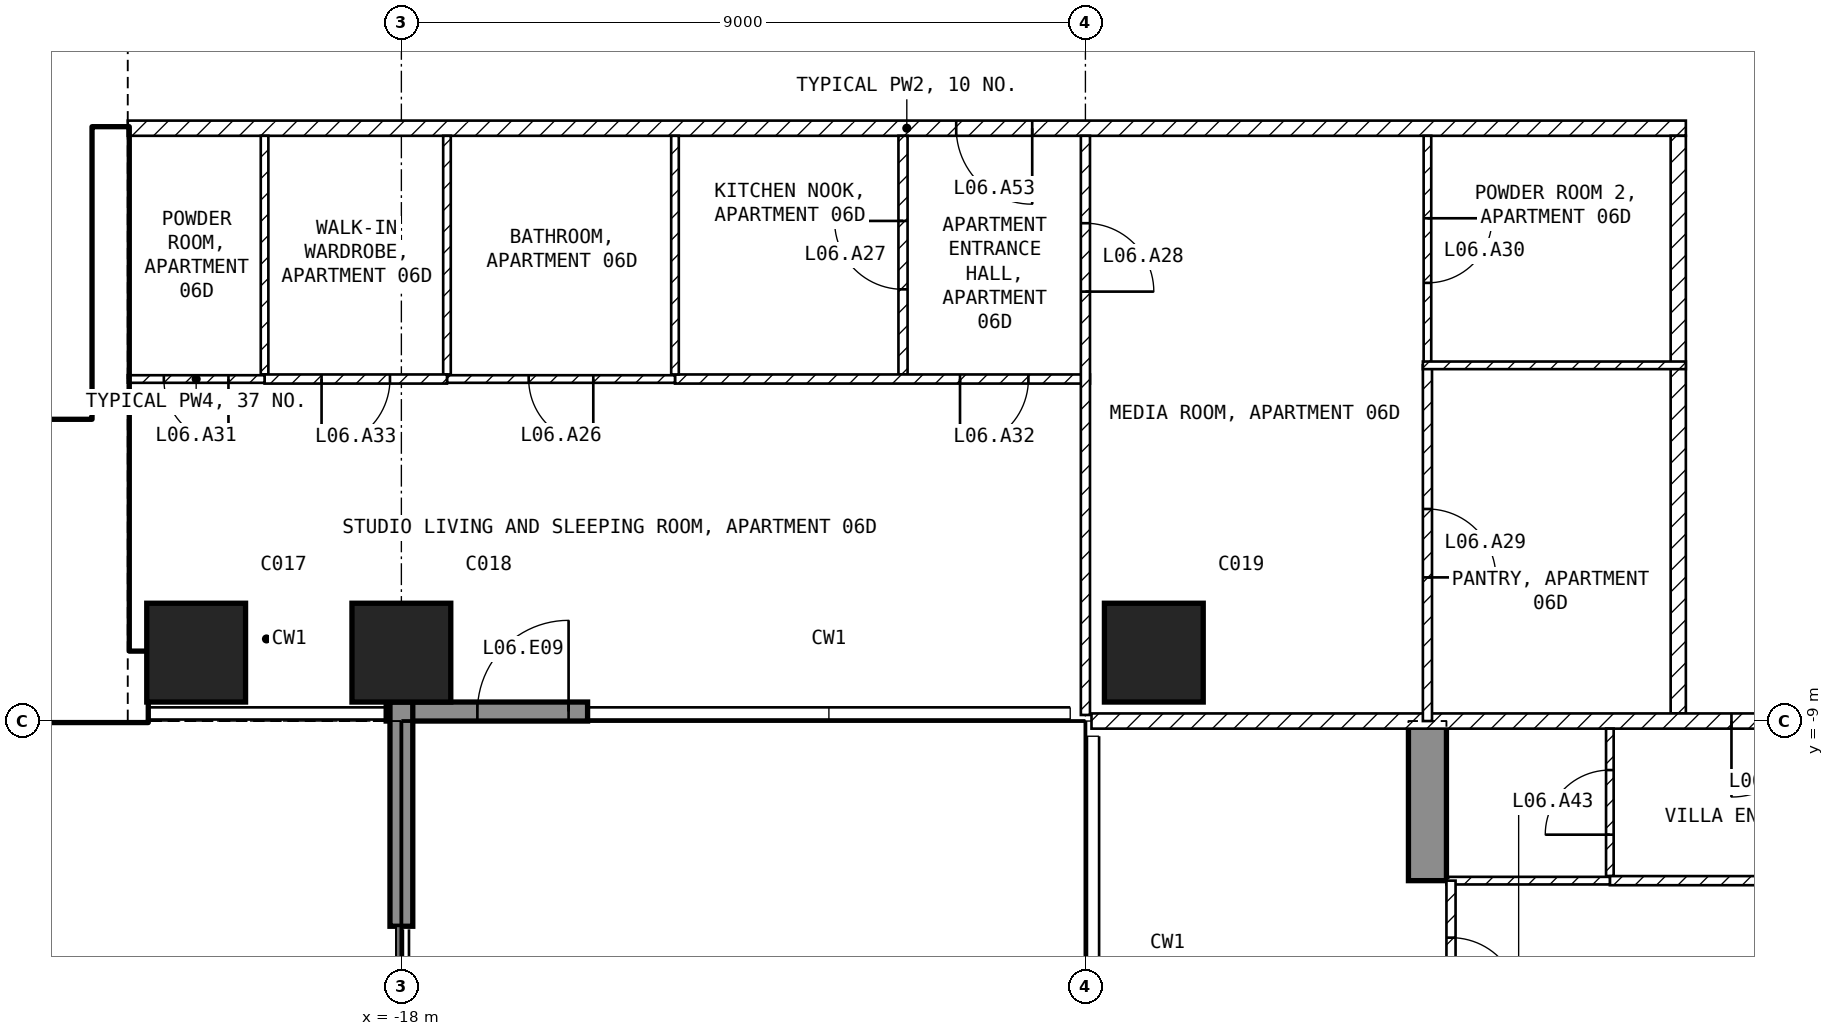
"""IFC4 building model, lengths in metres.
Left out: names, types, materials, properties, quantities, classifications, styles, units other than length and angle.
Written with IfcOpenShell. Run it as: python <this file> out.ifc"""

import sys

from ifc_helpers import new_model, si_unit, direction, frame, frame_2d, origin, origin_2d, place, context, subcontext, project, spatial, polyline, rectangle, outline, extrude, element, fill, save


model = new_model("IFC4")
c1 = context("Model", 3, precision=1e-05, world=origin(), true_north=direction((0.0, 1.0)))
c2 = subcontext(c1, "Body", "Model", "MODEL_VIEW")
j1 = project(units=[si_unit("LENGTHUNIT", "METRE"), si_unit("PLANEANGLEUNIT", "RADIAN")], contexts=[c1])
p1 = place(None, origin())
s1 = spatial("IfcSite", under=j1, at=p1, CompositionType="ELEMENT")
p2 = place(p1, origin())
s2 = spatial("IfcBuilding", under=s1, at=p2, CompositionType="ELEMENT")
p3 = place(p2, frame((0.0, 0.0, 40.0)))
s3 = spatial("IfcBuildingStorey", under=s2, at=p3, CompositionType="ELEMENT", Elevation=40.0)
for number, where, z_axis, x_axis in (
    (1, (-20.7, -8.1, -0.25), (0.0, 0.0, 1.0), (1.0, 0.0, 0.0)),
    (2, (-18.0, -8.1, -0.25), (0.0, 0.0, 1.0), (1.0, 0.0, 0.0)),
    (3, (-8.1, -8.1, -0.25), (0.0, 0.0, 1.0), (1.0, 0.0, 0.0)),
):
    element("IfcColumn", number, at=place(p3, frame(where, z_axis=z_axis, x_axis=x_axis)), inside=s3, PredefinedType="COLUMN", context=c2, shape_type="SweptSolid", body=[
        extrude(rectangle(XDim=1.3, YDim=1.3, at=origin_2d()), origin(), (0.0, 0.0, 1.0), 3.5),
    ])
p4 = place(p3, frame((-4.75, -25.45, -0.25), z_axis=(1.0, 0.0, 0.0), x_axis=(0.0, 1.0, 0.0)))
e4 = element("IfcWall", 4, at=p4, inside=s3, PredefinedType="SHEAR", context=c2, shape_type="SweptSolid", body=[
    extrude(outline(polyline([(0.0, 0.0), (4.15, 0.0), (4.15, 2.65), (6.55, 2.65), (6.55, 0.0), (11.95, 0.0), (11.95, 2.65), (14.35, 2.65), (14.35, 0.0), (16.45, 0.0), (16.45, 3.5), (0.0, 3.5), (0.0, 0.0)])), origin(), (0.0, 0.0, 1.0), 0.5),
])
p5 = place(p3, frame((-18.2, -8.875, 0.0), z_axis=(0.0, 0.0, 1.0), x_axis=(1.0, 0.0, 0.0)))
e5 = element("IfcWall", 5, at=p5, inside=s3, PredefinedType="SOLIDWALL", context=c2, shape_type="SweptSolid", body=[
    extrude(rectangle(XDim=2.65, YDim=0.25, at=frame_2d((1.325, 0.0))), origin(), (0.0, 0.0, 1.0), 3.25),
])
p6 = place(p5, frame((1.2, 0.0, 0.0)))
e6 = element("IfcOpeningElement", 6, at=p6, cuts=e5, PredefinedType="OPENING", context=c2, shape_type="SweptSolid", body=[
    extrude(rectangle(XDim=1.2, YDim=2.4, at=frame_2d((0.6, 1.2))), frame((0.0, 0.135, 0.0), z_axis=(0.0, -1.0, 0.0), x_axis=(1.0, 0.0, 0.0)), (0.0, 0.0, 1.0), 0.27),
])
p7 = place(p3, frame((-18.0, -8.75, 0.0), z_axis=(0.0, 0.0, 1.0), x_axis=(0.0, -1.0, 0.0)))
e7 = element("IfcWall", 7, at=p7, inside=s3, PredefinedType="SOLIDWALL", context=c2, shape_type="SweptSolid", body=[
    extrude(rectangle(XDim=2.95, YDim=0.3, at=frame_2d((1.475, 0.0))), origin(), (0.0, 0.0, 1.0), 3.25),
])
p8 = place(p3, frame((-32.4, -8.55, 0.0), z_axis=(0.0, 0.0, 1.0), x_axis=(1.0, 0.0, 0.0)))
e8 = element("IfcWall", 8, at=p8, inside=s3, PredefinedType="SHEAR", context=c2, shape_type="SweptSolid", body=[
    extrude(rectangle(XDim=11.05, YDim=0.9, at=frame_2d((5.525, 0.0))), origin(), (0.0, 0.0, 1.0), 3.25),
])
p9 = place(p3, frame((-21.825, -8.1, 0.0), z_axis=(0.0, 0.0, 1.0), x_axis=(0.0, 1.0, 0.0)))
e9 = element("IfcWall", 9, at=p9, inside=s3, PredefinedType="SHEAR", context=c2, shape_type="SweptSolid", body=[
    extrude(rectangle(XDim=6.9, YDim=0.45, at=frame_2d((3.45, 0.0))), origin(), (0.0, 0.0, 1.0), 3.25),
])
p10 = place(p3, frame((-28.35, -5.15, 0.0), z_axis=(0.0, 0.0, 1.0), x_axis=(1.0, 0.0, 0.0)))
e10 = element("IfcWall", 10, at=p10, inside=s3, PredefinedType="SOLIDWALL", context=c2, shape_type="SweptSolid", body=[
    extrude(rectangle(XDim=6.3, YDim=0.2, at=frame_2d((3.15, 0.0))), origin(), (0.0, 0.0, 1.0), 3.25),
])
p11 = place(p10, frame((5.1, 0.0, 0.0)))
e11 = element("IfcOpeningElement", 11, at=p11, cuts=e10, PredefinedType="OPENING", context=c2, shape_type="SweptSolid", body=[
    extrude(rectangle(XDim=1.0, YDim=2.1, at=frame_2d((0.5, 1.05))), frame((0.0, 0.11, 0.0), z_axis=(0.0, -1.0, 0.0), x_axis=(1.0, 0.0, 0.0)), (0.0, 0.0, 1.0), 0.22),
])
p12 = place(p3, frame((-1.1, -1.2, 0.0), z_axis=(0.0, 0.0, 1.0), x_axis=(-1.0, 0.0, 0.0)))
e12 = element("IfcWall", 12, at=p12, inside=s3, PredefinedType="PARTITIONING", context=c2, shape_type="SweptSolid", body=[
    extrude(rectangle(XDim=20.5, YDim=0.2, at=frame_2d((10.25, 0.0))), origin(), (0.0, 0.0, 1.0), 3.25),
])
p13 = place(p12, frame((8.6, 0.0, 0.0)))
e13 = element("IfcOpeningElement", 13, at=p13, cuts=e12, PredefinedType="OPENING", context=c2, shape_type="SweptSolid", body=[
    extrude(rectangle(XDim=1.0, YDim=2.1, at=frame_2d((0.5, 1.05))), frame((0.0, 0.11, 0.0), z_axis=(0.0, -1.0, 0.0), x_axis=(1.0, 0.0, 0.0)), (0.0, 0.0, 1.0), 0.22),
])
p14 = place(p3, frame((-1.2, -8.9, 0.0), z_axis=(0.0, 0.0, 1.0), x_axis=(0.0, 1.0, 0.0)))
e14 = element("IfcWall", 14, at=p14, inside=s3, PredefinedType="PARTITIONING", context=c2, shape_type="SweptSolid", body=[
    extrude(rectangle(XDim=7.6, YDim=0.2, at=frame_2d((3.8, 0.0))), origin(), (0.0, 0.0, 1.0), 3.25),
])
p15 = place(p3, frame((8.92, -9.0, 0.0), z_axis=(0.0, 0.0, 1.0), x_axis=(-1.0, 0.0, 0.0)))
e15 = element("IfcWall", 15, at=p15, inside=s3, PredefinedType="PARTITIONING", context=c2, shape_type="SweptSolid", body=[
    extrude(rectangle(XDim=17.84, YDim=0.2, at=frame_2d((8.92, 0.0))), origin(), (0.0, 0.0, 1.0), 3.25),
])
p16 = place(p15, frame((8.42, 0.0, 0.0)))
e16 = element("IfcOpeningElement", 16, at=p16, cuts=e15, PredefinedType="OPENING", context=c2, shape_type="SweptSolid", body=[
    extrude(rectangle(XDim=1.0, YDim=2.1, at=frame_2d((0.5, 1.05))), frame((0.0, 0.11, 0.0), z_axis=(0.0, -1.0, 0.0), x_axis=(1.0, 0.0, 0.0)), (0.0, 0.0, 1.0), 0.22),
])
p17 = place(p3, frame((-11.4, -4.44, 0.0), z_axis=(0.0, 0.0, 1.0), x_axis=(0.0, 1.0, 0.0)))
e17 = element("IfcWall", 17, at=p17, inside=s3, PredefinedType="PARTITIONING", context=c2, shape_type="SweptSolid", body=[
    extrude(rectangle(XDim=3.14, YDim=0.12, at=frame_2d((1.57, 0.0))), origin(), (0.0, 0.0, 1.0), 3.25),
])
p18 = place(p17, frame((1.12, 0.0, 0.0)))
e18 = element("IfcOpeningElement", 18, at=p18, cuts=e17, PredefinedType="OPENING", context=c2, shape_type="SweptSolid", body=[
    extrude(rectangle(XDim=0.9, YDim=2.1, at=frame_2d((0.45, 1.05))), frame((0.0, 0.07, 0.0), z_axis=(0.0, -1.0, 0.0), x_axis=(1.0, 0.0, 0.0)), (0.0, 0.0, 1.0), 0.14),
])
p19 = place(p3, frame((-8.94, -4.5, 0.0), z_axis=(0.0, 0.0, 1.0), x_axis=(-1.0, 0.0, 0.0)))
e19 = element("IfcWall", 19, at=p19, inside=s3, PredefinedType="PARTITIONING", context=c2, shape_type="SweptSolid", body=[
    extrude(rectangle(XDim=5.46, YDim=0.12, at=frame_2d((2.73, 0.0))), origin(), (0.0, 0.0, 1.0), 3.25),
])
p20 = place(p19, frame((0.81, 0.0, 0.0)))
e20 = element("IfcOpeningElement", 20, at=p20, cuts=e19, PredefinedType="OPENING", context=c2, shape_type="SweptSolid", body=[
    extrude(rectangle(XDim=0.9, YDim=2.1, at=frame_2d((0.45, 1.05))), frame((0.0, 0.07, 0.0), z_axis=(0.0, -1.0, 0.0), x_axis=(1.0, 0.0, 0.0)), (0.0, 0.0, 1.0), 0.14),
])
p21 = place(p3, frame((-9.0, -1.3, 0.0), z_axis=(0.0, 0.0, 1.0), x_axis=(0.0, -1.0, 0.0)))
e21 = element("IfcWall", 21, at=p21, inside=s3, PredefinedType="PARTITIONING", context=c2, shape_type="SweptSolid", body=[
    extrude(rectangle(XDim=7.62, YDim=0.12, at=frame_2d((3.81, 0.0))), origin(), (0.0, 0.0, 1.0), 3.25),
])
p22 = place(p21, frame((1.15, 0.0, 0.0)))
e22 = element("IfcOpeningElement", 22, at=p22, cuts=e21, PredefinedType="OPENING", context=c2, shape_type="SweptSolid", body=[
    extrude(rectangle(XDim=0.9, YDim=2.1, at=frame_2d((0.45, 1.05))), frame((0.0, 0.07, 0.0), z_axis=(0.0, -1.0, 0.0), x_axis=(1.0, 0.0, 0.0)), (0.0, 0.0, 1.0), 0.14),
])
for number, where, z_axis, x_axis in (
    (23, (-14.4, -4.44, 0.0), (0.0, 0.0, 1.0), (0.0, 1.0, 0.0)),
    (24, (-17.4, -4.44, 0.0), (0.0, 0.0, 1.0), (0.0, 1.0, 0.0)),
):
    element("IfcWall", number, at=place(p3, frame(where, z_axis=z_axis, x_axis=x_axis)), inside=s3, PredefinedType="PARTITIONING", context=c2, shape_type="SweptSolid", body=[
        extrude(rectangle(XDim=3.14, YDim=0.1, at=frame_2d((1.57, 0.0))), origin(), (0.0, 0.0, 1.0), 3.25),
    ])
p23 = place(p3, frame((-14.4, -4.5, 0.0), z_axis=(0.0, 0.0, 1.0), x_axis=(-1.0, 0.0, 0.0)))
e25 = element("IfcWall", 25, at=p23, inside=s3, PredefinedType="PARTITIONING", context=c2, shape_type="SweptSolid", body=[
    extrude(rectangle(XDim=3.0, YDim=0.1, at=frame_2d((1.5, 0.0))), origin(), (0.0, 0.0, 1.0), 3.25),
])
p24 = place(p23, frame((1.075, 0.0, 0.0)))
e26 = element("IfcOpeningElement", 26, at=p24, cuts=e25, PredefinedType="OPENING", context=c2, shape_type="SweptSolid", body=[
    extrude(rectangle(XDim=0.85, YDim=2.1, at=frame_2d((0.425, 1.05))), frame((0.0, 0.06, 0.0), z_axis=(0.0, -1.0, 0.0), x_axis=(1.0, 0.0, 0.0)), (0.0, 0.0, 1.0), 0.12),
])
p25 = place(p3, frame((-19.8, -4.44, 0.0), z_axis=(0.0, 0.0, 1.0), x_axis=(0.0, 1.0, 0.0)))
e27 = element("IfcWall", 27, at=p25, inside=s3, PredefinedType="PARTITIONING", context=c2, shape_type="SweptSolid", body=[
    extrude(rectangle(XDim=3.14, YDim=0.1, at=frame_2d((1.57, 0.0))), origin(), (0.0, 0.0, 1.0), 3.25),
])
p26 = place(p3, frame((-17.4, -4.5, 0.0), z_axis=(0.0, 0.0, 1.0), x_axis=(-1.0, 0.0, 0.0)))
e28 = element("IfcWall", 28, at=p26, inside=s3, PredefinedType="PARTITIONING", context=c2, shape_type="SweptSolid", body=[
    extrude(rectangle(XDim=2.4, YDim=0.12, at=frame_2d((1.2, 0.0))), origin(), (0.0, 0.0, 1.0), 3.25),
])
p27 = place(p26, frame((0.75, 0.0, 0.0)))
e29 = element("IfcOpeningElement", 29, at=p27, cuts=e28, PredefinedType="OPENING", context=c2, shape_type="SweptSolid", body=[
    extrude(rectangle(XDim=0.9, YDim=2.1, at=frame_2d((0.45, 1.05))), frame((0.0, 0.07, 0.0), z_axis=(0.0, -1.0, 0.0), x_axis=(1.0, 0.0, 0.0)), (0.0, 0.0, 1.0), 0.14),
])
p28 = place(p3, frame((-19.8, -4.5, 0.0), z_axis=(0.0, 0.0, 1.0), x_axis=(-1.0, 0.0, 0.0)))
e30 = element("IfcWall", 30, at=p28, inside=s3, PredefinedType="PARTITIONING", context=c2, shape_type="SweptSolid", body=[
    extrude(rectangle(XDim=1.8, YDim=0.1, at=frame_2d((0.9, 0.0))), origin(), (0.0, 0.0, 1.0), 3.25),
])
p29 = place(p28, frame((0.475, 0.0, 0.0)))
e31 = element("IfcOpeningElement", 31, at=p29, cuts=e30, PredefinedType="OPENING", context=c2, shape_type="SweptSolid", body=[
    extrude(rectangle(XDim=0.85, YDim=2.1, at=frame_2d((0.425, 1.05))), frame((0.0, 0.06, 0.0), z_axis=(0.0, -1.0, 0.0), x_axis=(1.0, 0.0, 0.0)), (0.0, 0.0, 1.0), 0.12),
])
p30 = place(p3, frame((-4.5, -1.3, 0.0), z_axis=(0.0, 0.0, 1.0), x_axis=(0.0, -1.0, 0.0)))
e32 = element("IfcWall", 32, at=p30, inside=s3, PredefinedType="PARTITIONING", context=c2, shape_type="SweptSolid", body=[
    extrude(rectangle(XDim=3.02, YDim=0.1, at=frame_2d((1.51, 0.0))), origin(), (0.0, 0.0, 1.0), 3.25),
])
p31 = place(p30, frame((1.085, 0.0, 0.0)))
e33 = element("IfcOpeningElement", 33, at=p31, cuts=e32, PredefinedType="OPENING", context=c2, shape_type="SweptSolid", body=[
    extrude(rectangle(XDim=0.85, YDim=2.1, at=frame_2d((0.425, 1.05))), frame((0.0, 0.06, 0.0), z_axis=(0.0, -1.0, 0.0), x_axis=(1.0, 0.0, 0.0)), (0.0, 0.0, 1.0), 0.12),
])
p32 = place(p3, frame((-4.5, -4.32, 0.0), z_axis=(0.0, 0.0, 1.0), x_axis=(0.0, -1.0, 0.0)))
e34 = element("IfcWall", 34, at=p32, inside=s3, PredefinedType="PARTITIONING", context=c2, shape_type="SweptSolid", body=[
    extrude(rectangle(XDim=4.68, YDim=0.12, at=frame_2d((2.34, 0.0))), origin(), (0.0, 0.0, 1.0), 3.25),
])
p33 = place(p32, frame((1.89, 0.0, 0.0)))
e35 = element("IfcOpeningElement", 35, at=p33, cuts=e34, PredefinedType="OPENING", context=c2, shape_type="SweptSolid", body=[
    extrude(rectangle(XDim=0.9, YDim=2.1, at=frame_2d((0.45, 1.05))), frame((0.0, 0.07, 0.0), z_axis=(0.0, -1.0, 0.0), x_axis=(1.0, 0.0, 0.0)), (0.0, 0.0, 1.0), 0.14),
])
p34 = place(p3, frame((-1.1, -4.32, 0.0), z_axis=(0.0, 0.0, 1.0), x_axis=(-1.0, 0.0, 0.0)))
e36 = element("IfcWall", 36, at=p34, inside=s3, PredefinedType="PARTITIONING", context=c2, shape_type="SweptSolid", body=[
    extrude(rectangle(XDim=3.46, YDim=0.1, at=frame_2d((1.73, 0.0))), origin(), (0.0, 0.0, 1.0), 3.25),
])
p35 = place(p3, frame((-2.1, -11.04, 0.0), z_axis=(0.0, 0.0, 1.0), x_axis=(0.0, 1.0, 0.0)))
e37 = element("IfcWall", 37, at=p35, inside=s3, PredefinedType="PARTITIONING", context=c2, shape_type="SweptSolid", body=[
    extrude(rectangle(XDim=1.94, YDim=0.1, at=frame_2d((0.97, 0.0))), origin(), (0.0, 0.0, 1.0), 3.25),
])
p36 = place(p35, frame((0.545, 0.0, 0.0)))
e38 = element("IfcOpeningElement", 38, at=p36, cuts=e37, PredefinedType="OPENING", context=c2, shape_type="SweptSolid", body=[
    extrude(rectangle(XDim=0.85, YDim=2.1, at=frame_2d((0.425, 1.05))), frame((0.0, 0.06, 0.0), z_axis=(0.0, -1.0, 0.0), x_axis=(1.0, 0.0, 0.0)), (0.0, 0.0, 1.0), 0.12),
])
p37 = place(p3, frame((4.25, -11.1, 0.0), z_axis=(0.0, 0.0, 1.0), x_axis=(-1.0, 0.0, 0.0)))
e39 = element("IfcWall", 39, at=p37, inside=s3, PredefinedType="PARTITIONING", context=c2, shape_type="SweptSolid", body=[
    extrude(rectangle(XDim=6.35, YDim=0.12, at=frame_2d((3.175, 0.0))), origin(), (0.0, 0.0, 1.0), 3.25),
])
p38 = place(p37, frame((2.725, 0.0, 0.0)))
e40 = element("IfcOpeningElement", 40, at=p38, cuts=e39, PredefinedType="OPENING", context=c2, shape_type="SweptSolid", body=[
    extrude(rectangle(XDim=0.9, YDim=2.1, at=frame_2d((0.45, 1.05))), frame((0.0, 0.07, 0.0), z_axis=(0.0, -1.0, 0.0), x_axis=(1.0, 0.0, 0.0)), (0.0, 0.0, 1.0), 0.14),
])
p39 = place(p3, frame((-2.1, -11.1, 0.0), z_axis=(0.0, 0.0, 1.0), x_axis=(-1.0, 0.0, 0.0)))
e41 = element("IfcWall", 41, at=p39, inside=s3, PredefinedType="PARTITIONING", context=c2, shape_type="SweptSolid", body=[
    extrude(rectangle(XDim=2.15, YDim=0.1, at=frame_2d((1.075, 0.0))), origin(), (0.0, 0.0, 1.0), 3.25),
])
p40 = place(p3, frame((-4.19, -11.1, 0.0), z_axis=(0.0, 0.0, 1.0), x_axis=(0.0, -1.0, 0.0)))
e42 = element("IfcWall", 42, at=p40, inside=s3, PredefinedType="PARTITIONING", context=c2, shape_type="SweptSolid", body=[
    extrude(rectangle(XDim=2.4, YDim=0.12, at=frame_2d((1.2, 0.0))), origin(), (0.0, 0.0, 1.0), 2.4),
])
p41 = place(p40, frame((0.75, 0.0, 0.0)))
e43 = element("IfcOpeningElement", 43, at=p41, cuts=e42, PredefinedType="OPENING", context=c2, shape_type="SweptSolid", body=[
    extrude(rectangle(XDim=0.9, YDim=2.1, at=frame_2d((0.45, 1.05))), frame((0.0, 0.07, 0.0), z_axis=(0.0, -1.0, 0.0), x_axis=(1.0, 0.0, 0.0)), (0.0, 0.0, 1.0), 0.14),
])
p42 = place(p6, origin())
e44 = element("IfcDoor", 44, at=p42, inside=s3, OperationType="SINGLE_SWING_RIGHT", PredefinedType="DOOR", context=c2, shape_type="SweptSolid", body=[
    extrude(rectangle(XDim=1.2, YDim=2.4, at=frame_2d((0.6, 1.2))), frame((0.0, 0.025, 0.0), z_axis=(0.0, -1.0, 0.0), x_axis=(1.0, 0.0, 0.0)), (0.0, 0.0, 1.0), 0.05),
])
fill(e6, e44)
p43 = place(p11, origin())
e45 = element("IfcDoor", 45, at=p43, inside=s3, OperationType="SINGLE_SWING_LEFT", PredefinedType="DOOR", context=c2, shape_type="SweptSolid", body=[
    extrude(rectangle(XDim=1.0, YDim=2.1, at=frame_2d((0.5, 1.05))), frame((0.0, 0.025, 0.0), z_axis=(0.0, -1.0, 0.0), x_axis=(1.0, 0.0, 0.0)), (0.0, 0.0, 1.0), 0.05),
])
fill(e11, e45)
p44 = place(p24, origin())
e46 = element("IfcDoor", 46, at=p44, inside=s3, OperationType="SINGLE_SWING_LEFT", PredefinedType="DOOR", context=c2, shape_type="SweptSolid", body=[
    extrude(rectangle(XDim=0.85, YDim=2.1, at=frame_2d((0.425, 1.05))), frame((0.0, 0.025, 0.0), z_axis=(0.0, -1.0, 0.0), x_axis=(1.0, 0.0, 0.0)), (0.0, 0.0, 1.0), 0.05),
])
fill(e26, e46)
p45 = place(p18, origin())
e47 = element("IfcDoor", 47, at=p45, inside=s3, OperationType="SINGLE_SWING_RIGHT", PredefinedType="DOOR", context=c2, shape_type="SweptSolid", body=[
    extrude(rectangle(XDim=0.9, YDim=2.1, at=frame_2d((0.45, 1.05))), frame((0.0, 0.025, 0.0), z_axis=(0.0, -1.0, 0.0), x_axis=(1.0, 0.0, 0.0)), (0.0, 0.0, 1.0), 0.05),
])
fill(e18, e47)
p46 = place(p22, origin())
e48 = element("IfcDoor", 48, at=p46, inside=s3, OperationType="SINGLE_SWING_RIGHT", PredefinedType="DOOR", context=c2, shape_type="SweptSolid", body=[
    extrude(rectangle(XDim=0.9, YDim=2.1, at=frame_2d((0.45, 1.05))), frame((0.0, 0.025, 0.0), z_axis=(0.0, -1.0, 0.0), x_axis=(1.0, 0.0, 0.0)), (0.0, 0.0, 1.0), 0.05),
])
fill(e22, e48)
p47 = place(p33, origin())
e49 = element("IfcDoor", 49, at=p47, inside=s3, OperationType="SINGLE_SWING_RIGHT", PredefinedType="DOOR", context=c2, shape_type="SweptSolid", body=[
    extrude(rectangle(XDim=0.9, YDim=2.1, at=frame_2d((0.45, 1.05))), frame((0.0, 0.025, 0.0), z_axis=(0.0, -1.0, 0.0), x_axis=(1.0, 0.0, 0.0)), (0.0, 0.0, 1.0), 0.05),
])
fill(e35, e49)
p48 = place(p31, origin())
e50 = element("IfcDoor", 50, at=p48, inside=s3, OperationType="SINGLE_SWING_LEFT", PredefinedType="DOOR", context=c2, shape_type="SweptSolid", body=[
    extrude(rectangle(XDim=0.85, YDim=2.1, at=frame_2d((0.425, 1.05))), frame((0.0, 0.025, 0.0), z_axis=(0.0, -1.0, 0.0), x_axis=(1.0, 0.0, 0.0)), (0.0, 0.0, 1.0), 0.05),
])
fill(e33, e50)
p49 = place(p29, origin())
e51 = element("IfcDoor", 51, at=p49, inside=s3, OperationType="SINGLE_SWING_LEFT", PredefinedType="DOOR", context=c2, shape_type="SweptSolid", body=[
    extrude(rectangle(XDim=0.85, YDim=2.1, at=frame_2d((0.425, 1.05))), frame((0.0, 0.025, 0.0), z_axis=(0.0, -1.0, 0.0), x_axis=(1.0, 0.0, 0.0)), (0.0, 0.0, 1.0), 0.05),
])
fill(e31, e51)
p50 = place(p20, origin())
e52 = element("IfcDoor", 52, at=p50, inside=s3, OperationType="SINGLE_SWING_RIGHT", PredefinedType="DOOR", context=c2, shape_type="SweptSolid", body=[
    extrude(rectangle(XDim=0.9, YDim=2.1, at=frame_2d((0.45, 1.05))), frame((0.0, 0.025, 0.0), z_axis=(0.0, -1.0, 0.0), x_axis=(1.0, 0.0, 0.0)), (0.0, 0.0, 1.0), 0.05),
])
fill(e20, e52)
p51 = place(p27, origin())
e53 = element("IfcDoor", 53, at=p51, inside=s3, OperationType="SINGLE_SWING_RIGHT", PredefinedType="DOOR", context=c2, shape_type="SweptSolid", body=[
    extrude(rectangle(XDim=0.9, YDim=2.1, at=frame_2d((0.45, 1.05))), frame((0.0, 0.025, 0.0), z_axis=(0.0, -1.0, 0.0), x_axis=(1.0, 0.0, 0.0)), (0.0, 0.0, 1.0), 0.05),
])
fill(e29, e53)
p52 = place(p16, origin())
e54 = element("IfcDoor", 54, at=p52, inside=s3, OperationType="SINGLE_SWING_RIGHT", PredefinedType="DOOR", context=c2, shape_type="SweptSolid", body=[
    extrude(rectangle(XDim=1.0, YDim=2.1, at=frame_2d((0.5, 1.05))), frame((0.0, 0.025, 0.0), z_axis=(0.0, -1.0, 0.0), x_axis=(1.0, 0.0, 0.0)), (0.0, 0.0, 1.0), 0.05),
])
fill(e16, e54)
p53 = place(p36, origin())
e55 = element("IfcDoor", 55, at=p53, inside=s3, OperationType="SINGLE_SWING_LEFT", PredefinedType="DOOR", context=c2, shape_type="SweptSolid", body=[
    extrude(rectangle(XDim=0.85, YDim=2.1, at=frame_2d((0.425, 1.05))), frame((0.0, 0.025, 0.0), z_axis=(0.0, -1.0, 0.0), x_axis=(1.0, 0.0, 0.0)), (0.0, 0.0, 1.0), 0.05),
])
fill(e38, e55)
p54 = place(p13, origin())
e56 = element("IfcDoor", 56, at=p54, inside=s3, OperationType="SINGLE_SWING_LEFT", PredefinedType="DOOR", context=c2, shape_type="SweptSolid", body=[
    extrude(rectangle(XDim=1.0, YDim=2.1, at=frame_2d((0.5, 1.05))), frame((0.0, 0.025, 0.0), z_axis=(0.0, -1.0, 0.0), x_axis=(1.0, 0.0, 0.0)), (0.0, 0.0, 1.0), 0.05),
])
fill(e13, e56)
p55 = place(p41, origin())
e57 = element("IfcDoor", 57, at=p55, inside=s3, OperationType="SINGLE_SWING_RIGHT", PredefinedType="DOOR", context=c2, shape_type="SweptSolid", body=[
    extrude(rectangle(XDim=0.9, YDim=2.1, at=frame_2d((0.45, 1.05))), frame((0.0, 0.025, 0.0), z_axis=(0.0, -1.0, 0.0), x_axis=(1.0, 0.0, 0.0)), (0.0, 0.0, 1.0), 0.05),
])
fill(e43, e57)
save(model, sys.argv[1])
